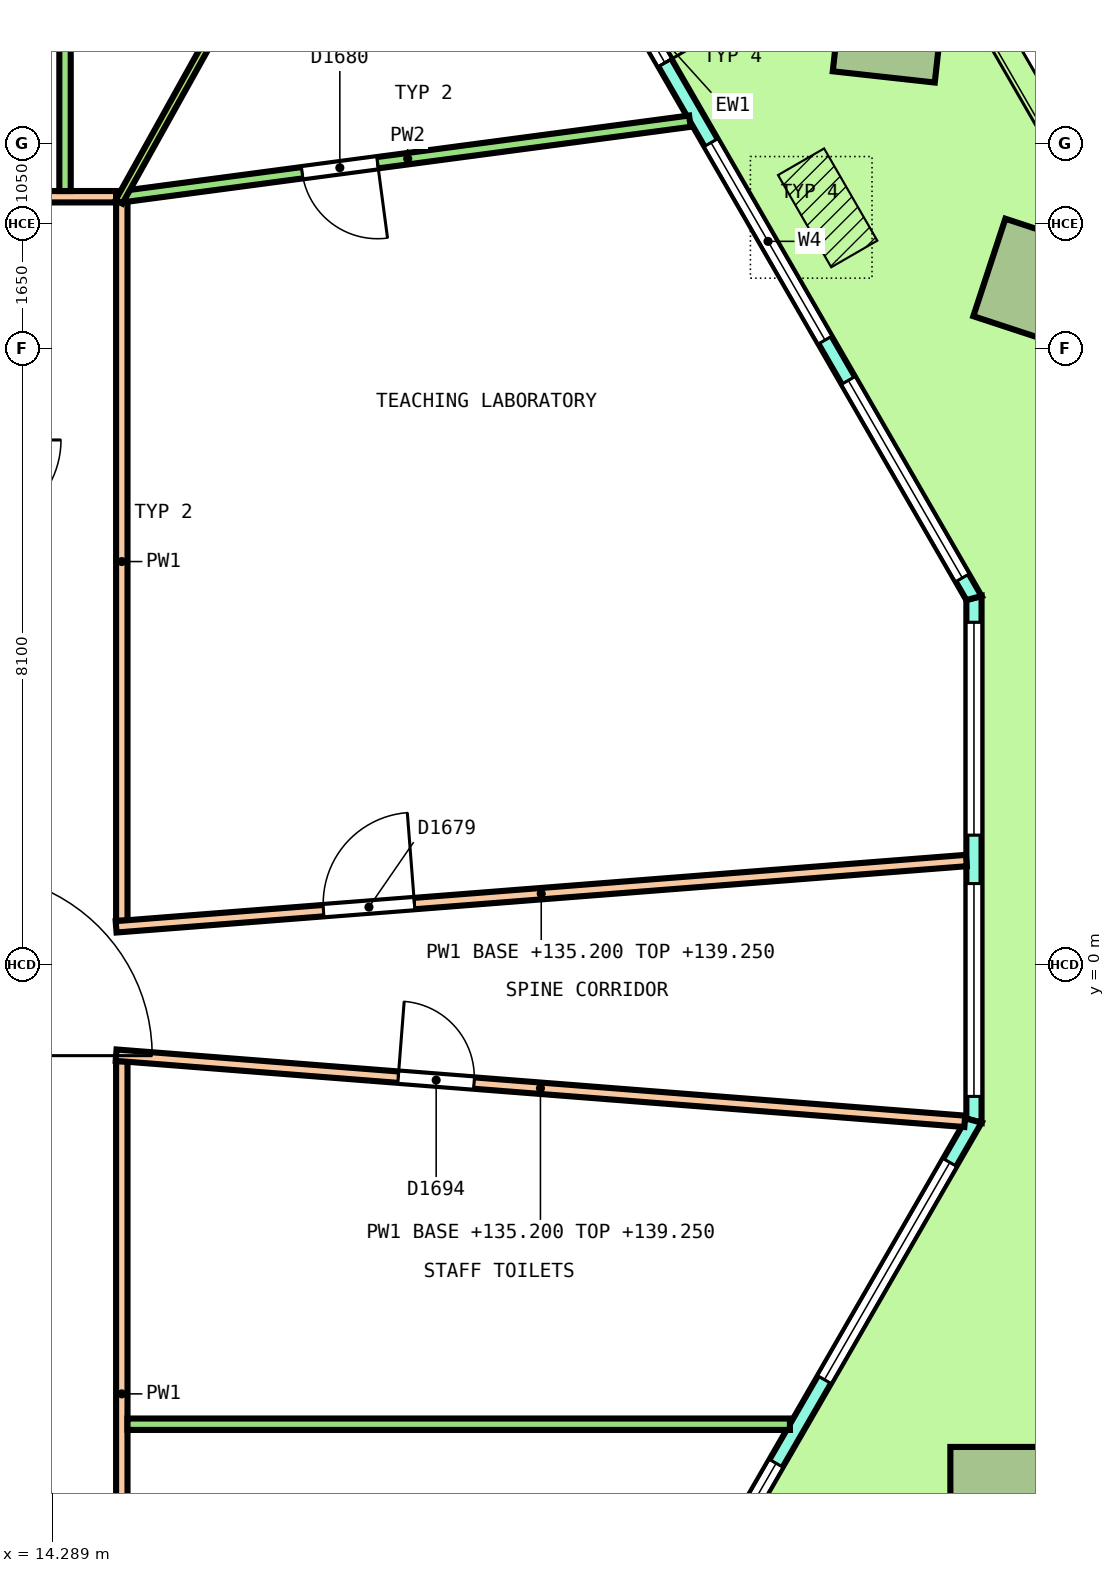
"""IFC4 building model, lengths in metres.
Left out: names, types, materials, properties, quantities, classifications, styles, units other than length and angle.
Written with IfcOpenShell. Run it as: python <this file> out.ifc"""

import sys

from ifc_helpers import new_model, si_unit, direction, frame, frame_2d, origin, origin_2d, place, context, subcontext, project, spatial, polyline, rectangle, outline, extrude, element, fill, save


model = new_model("IFC4")
c1 = context("Model", 3, precision=1e-05, world=origin(), true_north=direction((0.0, 1.0)))
c2 = subcontext(c1, "Body", "Model", "MODEL_VIEW")
j1 = project(units=[si_unit("LENGTHUNIT", "METRE"), si_unit("PLANEANGLEUNIT", "RADIAN")], contexts=[c1])
p1 = place(None, origin())
s1 = spatial("IfcSite", under=j1, at=p1, CompositionType="ELEMENT")
p2 = place(p1, origin())
s2 = spatial("IfcBuilding", under=s1, at=p2, CompositionType="ELEMENT")
p3 = place(p2, frame((0.0, 0.0, 135.2)))
s3 = spatial("IfcBuildingStorey", under=s2, at=p3, CompositionType="ELEMENT", Elevation=135.2)
p4 = place(p3, frame((27.255, 8.959, 0.0), z_axis=(-0.206604255639, -0.238543908815, 0.948900144967), x_axis=(-0.524107453988, 0.845931636481, 0.098544624791)))
e1 = element("IfcColumn", 1, at=p4, inside=s3, PredefinedType="COLUMN", context=c2, shape_type="SweptSolid", body=[
    extrude(rectangle(XDim=1.35, YDim=1.35, at=origin_2d()), origin(), (0.0, 0.0, 1.0), 4.258),
])
p5 = place(p3, frame((25.299, 12.347, 0.0), z_axis=(-0.242216248762, -0.179760869681, 0.953423997268), x_axis=(-0.508552704351, 0.860397321393, 0.033024176556)))
e2 = element("IfcColumn", 2, at=p5, inside=s3, PredefinedType="COLUMN", context=c2, shape_type="SweptSolid", body=[
    extrude(rectangle(XDim=1.35, YDim=1.35, at=origin_2d()), origin(), (0.0, 0.0, 1.0), 4.237),
])
p6 = place(p3, frame((26.776, -7.023, 0.0), z_axis=(-0.106402456539, -0.184226228858, 0.977107575369), x_axis=(0.488665296242, 0.846135593228, 0.212745825157)))
e3 = element("IfcColumn", 3, at=p6, inside=s3, PredefinedType="COLUMN", context=c2, shape_type="SweptSolid", body=[
    extrude(rectangle(XDim=1.35, YDim=1.35, at=origin_2d()), origin(), (0.0, 0.0, 1.0), 4.135),
])
p7 = place(p3, frame((26.411, -2.055, 0.0), z_axis=(0.0, 0.0, 1.0), x_axis=(0.0, 1.0, 0.0)))
e4 = element("IfcWall", 4, at=p7, inside=s3, PredefinedType="SOLIDWALL", context=c2, shape_type="SweptSolid", body=[
    extrude(outline(polyline([(-0.027, -0.1), (1.128, -0.1), (2.283, -0.1), (3.438, -0.1), (4.592, -0.1), (5.747, -0.1), (6.902, -0.1), (6.848, 0.1), (5.711, 0.1), (4.574, 0.1), (3.438, 0.1), (2.301, 0.1), (1.164, 0.1), (0.027, 0.1), (-0.027, -0.1)])), origin(), (0.0, 0.0, 1.0), 4.1),
])
p8 = place(p7, frame((0.319, 0.0, 0.1)))
e5 = element("IfcOpeningElement", 5, at=p8, cuts=e4, PredefinedType="OPENING", context=c2, shape_type="SweptSolid", body=[
    extrude(rectangle(XDim=2.8, YDim=2.9, at=frame_2d((1.4, 1.45))), frame((0.0, 0.11, 0.0), z_axis=(0.0, -1.0, 0.0), x_axis=(1.0, 0.0, 0.0)), (0.0, 0.0, 1.0), 0.22),
])
p9 = place(p7, frame((3.756, 0.0, 0.1)))
e6 = element("IfcOpeningElement", 6, at=p9, cuts=e4, PredefinedType="OPENING", context=c2, shape_type="SweptSolid", body=[
    extrude(rectangle(XDim=2.8, YDim=2.9, at=frame_2d((1.4, 1.45))), frame((0.0, 0.11, 0.0), z_axis=(0.0, -1.0, 0.0), x_axis=(1.0, 0.0, 0.0)), (0.0, 0.0, 1.0), 0.22),
])
p10 = place(p3, frame((26.411, 4.82, 0.0), z_axis=(0.0, 0.0, 1.0), x_axis=(-0.500000137386, 0.866025324465, 0.0)))
e7 = element("IfcWall", 7, at=p10, inside=s3, PredefinedType="SOLIDWALL", context=c2, shape_type="SweptSolid", body=[
    extrude(outline(polyline([(-0.027, -0.1), (0.979, -0.1), (1.986, -0.1), (2.992, -0.1), (3.999, -0.1), (5.005, -0.1), (6.012, -0.1), (7.018, -0.1), (8.025, -0.1), (9.031, -0.1), (10.038, -0.1), (11.044, -0.1), (12.051, -0.1), (13.057, -0.1), (14.063, -0.1), (15.07, -0.1), (16.076, -0.1), (17.083, -0.1), (18.089, -0.1), (18.036, 0.1), (17.035, 0.1), (16.035, 0.1), (15.034, 0.1), (14.034, 0.1), (13.033, 0.1), (12.033, 0.1), (11.032, 0.1), (10.032, 0.1), (9.031, 0.1), (8.031, 0.1), (7.03, 0.1), (6.03, 0.1), (5.029, 0.1), (4.029, 0.1), (3.028, 0.1), (2.028, 0.1), (1.027, 0.1), (0.027, 0.1), (-0.027, -0.1)])), origin(), (0.0, 0.0, 1.0), 4.1),
])
p11 = place(p10, frame((0.306, 0.0, 0.1)))
e8 = element("IfcOpeningElement", 8, at=p11, cuts=e7, PredefinedType="OPENING", context=c2, shape_type="SweptSolid", body=[
    extrude(rectangle(XDim=3.0, YDim=2.9, at=frame_2d((1.5, 1.45))), frame((0.0, 0.11, 0.0), z_axis=(0.0, -1.0, 0.0), x_axis=(1.0, 0.0, 0.0)), (0.0, 0.0, 1.0), 0.22),
])
p12 = place(p10, frame((3.919, 0.0, 0.1)))
e9 = element("IfcOpeningElement", 9, at=p12, cuts=e7, PredefinedType="OPENING", context=c2, shape_type="SweptSolid", body=[
    extrude(rectangle(XDim=3.0, YDim=2.9, at=frame_2d((1.5, 1.45))), frame((0.0, 0.11, 0.0), z_axis=(0.0, -1.0, 0.0), x_axis=(1.0, 0.0, 0.0)), (0.0, 0.0, 1.0), 0.22),
])
p13 = place(p10, frame((8.131, 0.0, 0.0)))
e10 = element("IfcOpeningElement", 10, at=p13, cuts=e7, PredefinedType="OPENING", context=c2, shape_type="SweptSolid", body=[
    extrude(rectangle(XDim=1.8, YDim=2.4, at=frame_2d((0.9, 1.2))), frame((0.0, 0.11, 0.0), z_axis=(0.0, -1.0, 0.0), x_axis=(1.0, 0.0, 0.0)), (0.0, 0.0, 1.0), 0.22),
])
p14 = place(p10, frame((8.131, 0.0, 2.55)))
e11 = element("IfcOpeningElement", 11, at=p14, cuts=e7, PredefinedType="OPENING", context=c2, shape_type="SweptSolid", body=[
    extrude(rectangle(XDim=1.8, YDim=0.45, at=frame_2d((0.9, 0.225))), frame((0.0, 0.11, 0.0), z_axis=(0.0, -1.0, 0.0), x_axis=(1.0, 0.0, 0.0)), (0.0, 0.0, 1.0), 0.22),
])
p15 = place(p10, frame((11.144, 0.0, 0.1)))
e12 = element("IfcOpeningElement", 12, at=p15, cuts=e7, PredefinedType="OPENING", context=c2, shape_type="SweptSolid", body=[
    extrude(rectangle(XDim=3.0, YDim=2.9, at=frame_2d((1.5, 1.45))), frame((0.0, 0.11, 0.0), z_axis=(0.0, -1.0, 0.0), x_axis=(1.0, 0.0, 0.0)), (0.0, 0.0, 1.0), 0.22),
])
p16 = place(p10, frame((14.756, 0.0, 0.1)))
e13 = element("IfcOpeningElement", 13, at=p16, cuts=e7, PredefinedType="OPENING", context=c2, shape_type="SweptSolid", body=[
    extrude(rectangle(XDim=3.0, YDim=2.9, at=frame_2d((1.5, 1.45))), frame((0.0, 0.11, 0.0), z_axis=(0.0, -1.0, 0.0), x_axis=(1.0, 0.0, 0.0)), (0.0, 0.0, 1.0), 0.22),
])
p17 = place(p3, frame((14.985, -21.845, 0.0), z_axis=(0.0, 0.0, 1.0), x_axis=(0.50000204422, 0.86602422355, 0.0)))
e14 = element("IfcWall", 14, at=p17, inside=s3, PredefinedType="SOLIDWALL", context=c2, shape_type="SweptSolid", body=[
    extrude(outline(polyline([(-0.027, -0.1), (1.014, -0.1), (2.055, -0.1), (3.097, -0.1), (4.138, -0.1), (5.179, -0.1), (6.22, -0.1), (7.261, -0.1), (8.303, -0.1), (9.344, -0.1), (10.385, -0.1), (11.426, -0.1), (12.468, -0.1), (13.509, -0.1), (14.55, -0.1), (15.591, -0.1), (16.632, -0.1), (17.673, -0.1), (18.715, -0.1), (19.756, -0.1), (20.797, -0.1), (21.838, -0.1), (22.879, -0.1), (22.826, 0.1), (21.789, 0.1), (20.753, 0.1), (19.717, 0.1), (18.68, 0.1), (17.644, 0.1), (16.608, 0.1), (15.572, 0.1), (14.535, 0.1), (13.499, 0.1), (12.463, 0.1), (11.426, 0.1), (10.39, 0.1), (9.354, 0.1), (8.317, 0.1), (7.281, 0.1), (6.245, 0.1), (5.208, 0.1), (4.172, 0.1), (3.136, 0.1), (2.099, 0.1), (1.063, 0.1), (0.027, 0.1), (-0.027, -0.1)])), origin(), (0.0, 0.0, 1.0), 4.1),
])
p18 = place(p17, frame((0.635, 0.0, 0.1)))
e15 = element("IfcOpeningElement", 15, at=p18, cuts=e14, PredefinedType="OPENING", context=c2, shape_type="SweptSolid", body=[
    extrude(rectangle(XDim=3.3, YDim=2.9, at=frame_2d((1.65, 1.45))), frame((0.0, 0.11, 0.0), z_axis=(0.0, -1.0, 0.0), x_axis=(1.0, 0.0, 0.0)), (0.0, 0.0, 1.0), 0.22),
])
p19 = place(p17, frame((5.206, 0.0, 0.1)))
e16 = element("IfcOpeningElement", 16, at=p19, cuts=e14, PredefinedType="OPENING", context=c2, shape_type="SweptSolid", body=[
    extrude(rectangle(XDim=3.3, YDim=2.9, at=frame_2d((1.65, 1.45))), frame((0.0, 0.11, 0.0), z_axis=(0.0, -1.0, 0.0), x_axis=(1.0, 0.0, 0.0)), (0.0, 0.0, 1.0), 0.22),
])
p20 = place(p17, frame((10.526, 0.0, 0.0)))
e17 = element("IfcOpeningElement", 17, at=p20, cuts=e14, PredefinedType="OPENING", context=c2, shape_type="SweptSolid", body=[
    extrude(rectangle(XDim=1.8, YDim=2.4, at=frame_2d((0.9, 1.2))), frame((0.0, 0.11, 0.0), z_axis=(0.0, -1.0, 0.0), x_axis=(1.0, 0.0, 0.0)), (0.0, 0.0, 1.0), 0.22),
])
p21 = place(p17, frame((10.526, 0.0, 2.55)))
e18 = element("IfcOpeningElement", 18, at=p21, cuts=e14, PredefinedType="OPENING", context=c2, shape_type="SweptSolid", body=[
    extrude(rectangle(XDim=1.8, YDim=0.45, at=frame_2d((0.9, 0.225))), frame((0.0, 0.11, 0.0), z_axis=(0.0, -1.0, 0.0), x_axis=(1.0, 0.0, 0.0)), (0.0, 0.0, 1.0), 0.22),
])
p22 = place(p17, frame((14.347, 0.0, 0.1)))
e19 = element("IfcOpeningElement", 19, at=p22, cuts=e14, PredefinedType="OPENING", context=c2, shape_type="SweptSolid", body=[
    extrude(rectangle(XDim=3.3, YDim=2.9, at=frame_2d((1.65, 1.45))), frame((0.0, 0.11, 0.0), z_axis=(0.0, -1.0, 0.0), x_axis=(1.0, 0.0, 0.0)), (0.0, 0.0, 1.0), 0.22),
])
p23 = place(p17, frame((18.917, 0.0, 0.1)))
e20 = element("IfcOpeningElement", 20, at=p23, cuts=e14, PredefinedType="OPENING", context=c2, shape_type="SweptSolid", body=[
    extrude(rectangle(XDim=3.3, YDim=2.9, at=frame_2d((1.65, 1.45))), frame((0.0, 0.11, 0.0), z_axis=(0.0, -1.0, 0.0), x_axis=(1.0, 0.0, 0.0)), (0.0, 0.0, 1.0), 0.22),
])
p24 = place(p3, frame((15.2, -10.025, 0.0), z_axis=(0.0, 0.0, 1.0), x_axis=(0.0, 1.0, 0.0)))
e21 = element("IfcWall", 21, at=p24, inside=s3, PredefinedType="PARTITIONING", context=c2, shape_type="SweptSolid", body=[
    extrude(rectangle(XDim=8.75, YDim=0.15, at=frame_2d((4.375, 0.0))), origin(), (0.0, 0.0, 1.0), 3.05),
])
p25 = place(p24, frame((0.813, 0.0, 0.0)))
e22 = element("IfcOpeningElement", 22, at=p25, cuts=e21, PredefinedType="OPENING", context=c2, shape_type="SweptSolid", body=[
    extrude(rectangle(XDim=1.2, YDim=2.1, at=frame_2d((0.6, 1.05))), frame((0.0, 0.085, 0.0), z_axis=(0.0, -1.0, 0.0), x_axis=(1.0, 0.0, 0.0)), (0.0, 0.0, 1.0), 0.17),
])
p26 = place(p3, frame((15.2, 0.576, 0.0), z_axis=(0.0, 0.0, 1.0), x_axis=(0.0, 1.0, 0.0)))
e23 = element("IfcWall", 23, at=p26, inside=s3, PredefinedType="PARTITIONING", context=c2, shape_type="SweptSolid", body=[
    extrude(rectangle(XDim=9.449, YDim=0.15, at=frame_2d((4.725, 0.0))), origin(), (0.0, 0.0, 1.0), 3.05),
])
p27 = place(p3, frame((-15.125, 10.1, 0.0), z_axis=(0.0, 0.0, 1.0), x_axis=(1.0, 0.0, 0.0)))
e24 = element("IfcWall", 24, at=p27, inside=s3, PredefinedType="PARTITIONING", context=c2, shape_type="SweptSolid", body=[
    extrude(rectangle(XDim=30.25, YDim=0.15, at=frame_2d((15.125, 0.0))), origin(), (0.0, 0.0, 1.0), 3.05),
])
p28 = place(p27, frame((16.895, 0.0, 0.0)))
e25 = element("IfcOpeningElement", 25, at=p28, cuts=e24, PredefinedType="OPENING", context=c2, shape_type="SweptSolid", body=[
    extrude(rectangle(XDim=1.2, YDim=2.1, at=frame_2d((0.6, 1.05))), frame((0.0, 0.085, 0.0), z_axis=(0.0, -1.0, 0.0), x_axis=(1.0, 0.0, 0.0)), (0.0, 0.0, 1.0), 0.17),
])
p29 = place(p27, frame((6.564, 0.0, 0.0)))
e26 = element("IfcOpeningElement", 26, at=p29, cuts=e24, PredefinedType="OPENING", context=c2, shape_type="SweptSolid", body=[
    extrude(rectangle(XDim=1.2, YDim=2.1, at=frame_2d((0.6, 1.05))), frame((0.0, 0.085, 0.0), z_axis=(0.0, -1.0, 0.0), x_axis=(1.0, 0.0, 0.0)), (0.0, 0.0, 1.0), 0.17),
])
p30 = place(p27, frame((1.476, 0.0, 0.0)))
e27 = element("IfcOpeningElement", 27, at=p30, cuts=e24, PredefinedType="OPENING", context=c2, shape_type="SweptSolid", body=[
    extrude(rectangle(XDim=1.2, YDim=2.1, at=frame_2d((0.6, 1.05))), frame((0.0, 0.085, 0.0), z_axis=(0.0, -1.0, 0.0), x_axis=(1.0, 0.0, 0.0)), (0.0, 0.0, 1.0), 0.17),
])
p31 = place(p3, frame((15.125, 0.495, 0.0), z_axis=(0.0, 0.0, 1.0), x_axis=(0.996973035288, 0.07774809907, 0.0)))
e28 = element("IfcWall", 28, at=p31, inside=s3, PredefinedType="PARTITIONING", context=c2, shape_type="SweptSolid", body=[
    extrude(rectangle(XDim=11.22, YDim=0.15, at=frame_2d((5.61, 0.0))), origin(), (0.0, 0.0, 1.0), 4.05),
])
p32 = place(p31, frame((2.736, 0.0, 0.0)))
e29 = element("IfcOpeningElement", 29, at=p32, cuts=e28, PredefinedType="OPENING", context=c2, shape_type="SweptSolid", body=[
    extrude(rectangle(XDim=1.2, YDim=2.1, at=frame_2d((0.6, 1.05))), frame((0.0, 0.085, 0.0), z_axis=(0.0, -1.0, 0.0), x_axis=(1.0, 0.0, 0.0)), (0.0, 0.0, 1.0), 0.17),
])
p33 = place(p3, frame((15.125, -1.194, 0.0), z_axis=(0.0, 0.0, 1.0), x_axis=(0.996973662759, -0.07774005251, 0.0)))
e30 = element("IfcWall", 30, at=p33, inside=s3, PredefinedType="PARTITIONING", context=c2, shape_type="SweptSolid", body=[
    extrude(rectangle(XDim=11.199, YDim=0.15, at=frame_2d((5.6, 0.0))), origin(), (0.0, 0.0, 1.0), 4.05),
])
p34 = place(p33, frame((3.723, 0.0, 0.0)))
e31 = element("IfcOpeningElement", 31, at=p34, cuts=e30, PredefinedType="OPENING", context=c2, shape_type="SweptSolid", body=[
    extrude(rectangle(XDim=1.0, YDim=2.1, at=frame_2d((0.5, 1.05))), frame((0.0, 0.085, 0.0), z_axis=(0.0, -1.0, 0.0), x_axis=(1.0, 0.0, 0.0)), (0.0, 0.0, 1.0), 0.17),
])
p35 = place(p3, frame((15.25, 10.107, 0.0), z_axis=(0.0, 0.0, 1.0), x_axis=(0.991272259153, 0.131830604315, 0.0)))
e32 = element("IfcWall", 32, at=p35, inside=s3, PredefinedType="PARTITIONING", context=c2, shape_type="SweptSolid", body=[
    extrude(rectangle(XDim=7.489, YDim=0.15, at=frame_2d((3.745, 0.0))), origin(), (0.0, 0.0, 1.0), 3.05),
])
p36 = place(p35, frame((2.344, 0.0, 0.0)))
e33 = element("IfcOpeningElement", 33, at=p36, cuts=e32, PredefinedType="OPENING", context=c2, shape_type="SweptSolid", body=[
    extrude(rectangle(XDim=1.0, YDim=2.1, at=frame_2d((0.5, 1.05))), frame((0.0, 0.085, 0.0), z_axis=(0.0, -1.0, 0.0), x_axis=(1.0, 0.0, 0.0)), (0.0, 0.0, 1.0), 0.17),
])
p37 = place(p3, frame((14.453, 10.175, 0.0), z_axis=(0.0, 0.0, 1.0), x_axis=(0.0, 1.0, 0.0)))
e34 = element("IfcWall", 34, at=p37, inside=s3, PredefinedType="PARTITIONING", context=c2, shape_type="SweptSolid", body=[
    extrude(rectangle(XDim=11.862, YDim=0.15, at=frame_2d((5.931, 0.0))), origin(), (0.0, 0.0, 1.0), 3.05),
])
p38 = place(p3, frame((15.275, -6.049, 0.0), z_axis=(0.0, 0.0, 1.0), x_axis=(1.0, 0.0, 0.0)))
e35 = element("IfcWall", 35, at=p38, inside=s3, PredefinedType="PARTITIONING", context=c2, shape_type="SweptSolid", body=[
    extrude(rectangle(XDim=8.715, YDim=0.15, at=frame_2d((4.357, 0.0))), origin(), (0.0, 0.0, 1.0), 3.05),
])
p39 = place(p3, frame((15.164, 10.034, 0.0), z_axis=(0.0, 0.0, 1.0), x_axis=(0.486568356271, 0.873642509655, 0.0)))
e36 = element("IfcWall", 36, at=p39, inside=s3, PredefinedType="PARTITIONING", context=c2, shape_type="SweptSolid", body=[
    extrude(rectangle(XDim=8.196, YDim=0.1, at=frame_2d((4.098, 0.0))), origin(), (0.0, 0.0, 1.0), 3.05),
])
p40 = place(p39, frame((3.635, 0.0, 0.0)))
e37 = element("IfcOpeningElement", 37, at=p40, cuts=e36, PredefinedType="OPENING", context=c2, shape_type="SweptSolid", body=[
    extrude(rectangle(XDim=1.0, YDim=2.1, at=frame_2d((0.5, 1.05))), frame((0.0, 0.06, 0.0), z_axis=(0.0, -1.0, 0.0), x_axis=(1.0, 0.0, 0.0)), (0.0, 0.0, 1.0), 0.12),
])
p41 = place(p8, origin())
e38 = element("IfcWindow", 38, at=p41, inside=s3, PartitioningType="SINGLE_PANEL", PredefinedType="WINDOW", context=c2, shape_type="SweptSolid", body=[
    extrude(rectangle(XDim=2.8, YDim=2.9, at=frame_2d((1.4, 1.45))), frame((0.0, 0.03, 0.0), z_axis=(0.0, -1.0, 0.0), x_axis=(1.0, 0.0, 0.0)), (0.0, 0.0, 1.0), 0.06),
])
fill(e5, e38)
p42 = place(p9, origin())
e39 = element("IfcWindow", 39, at=p42, inside=s3, PartitioningType="SINGLE_PANEL", PredefinedType="WINDOW", context=c2, shape_type="SweptSolid", body=[
    extrude(rectangle(XDim=2.8, YDim=2.9, at=frame_2d((1.4, 1.45))), frame((0.0, 0.03, 0.0), z_axis=(0.0, -1.0, 0.0), x_axis=(1.0, 0.0, 0.0)), (0.0, 0.0, 1.0), 0.06),
])
fill(e6, e39)
p43 = place(p11, origin())
e40 = element("IfcWindow", 40, at=p43, inside=s3, PartitioningType="SINGLE_PANEL", PredefinedType="WINDOW", context=c2, shape_type="SweptSolid", body=[
    extrude(rectangle(XDim=3.0, YDim=2.9, at=frame_2d((1.5, 1.45))), frame((0.0, 0.03, 0.0), z_axis=(0.0, -1.0, 0.0), x_axis=(1.0, 0.0, 0.0)), (0.0, 0.0, 1.0), 0.06),
])
fill(e8, e40)
p44 = place(p12, origin())
e41 = element("IfcWindow", 41, at=p44, inside=s3, PartitioningType="SINGLE_PANEL", PredefinedType="WINDOW", context=c2, shape_type="SweptSolid", body=[
    extrude(rectangle(XDim=3.0, YDim=2.9, at=frame_2d((1.5, 1.45))), frame((0.0, 0.03, 0.0), z_axis=(0.0, -1.0, 0.0), x_axis=(1.0, 0.0, 0.0)), (0.0, 0.0, 1.0), 0.06),
])
fill(e9, e41)
p45 = place(p13, origin())
e42 = element("IfcDoor", 42, at=p45, inside=s3, OperationType="DOUBLE_DOOR_SINGLE_SWING", PredefinedType="DOOR", context=c2, shape_type="SweptSolid", body=[
    extrude(rectangle(XDim=1.8, YDim=2.4, at=frame_2d((0.9, 1.2))), frame((0.0, 0.025, 0.0), z_axis=(0.0, -1.0, 0.0), x_axis=(1.0, 0.0, 0.0)), (0.0, 0.0, 1.0), 0.05),
])
fill(e10, e42)
p46 = place(p14, origin())
e43 = element("IfcWindow", 43, at=p46, inside=s3, PartitioningType="SINGLE_PANEL", PredefinedType="WINDOW", context=c2, shape_type="SweptSolid", body=[
    extrude(rectangle(XDim=1.8, YDim=0.45, at=frame_2d((0.9, 0.225))), frame((0.0, 0.03, 0.0), z_axis=(0.0, -1.0, 0.0), x_axis=(1.0, 0.0, 0.0)), (0.0, 0.0, 1.0), 0.06),
])
fill(e11, e43)
p47 = place(p22, origin())
e44 = element("IfcWindow", 44, at=p47, inside=s3, PartitioningType="SINGLE_PANEL", PredefinedType="WINDOW", context=c2, shape_type="SweptSolid", body=[
    extrude(rectangle(XDim=3.3, YDim=2.9, at=frame_2d((1.65, 1.45))), frame((0.0, 0.03, 0.0), z_axis=(0.0, -1.0, 0.0), x_axis=(1.0, 0.0, 0.0)), (0.0, 0.0, 1.0), 0.06),
])
fill(e19, e44)
p48 = place(p23, origin())
e45 = element("IfcWindow", 45, at=p48, inside=s3, PartitioningType="SINGLE_PANEL", PredefinedType="WINDOW", context=c2, shape_type="SweptSolid", body=[
    extrude(rectangle(XDim=3.3, YDim=2.9, at=frame_2d((1.65, 1.45))), frame((0.0, 0.03, 0.0), z_axis=(0.0, -1.0, 0.0), x_axis=(1.0, 0.0, 0.0)), (0.0, 0.0, 1.0), 0.06),
])
fill(e20, e45)
p49 = place(p32, origin())
e46 = element("IfcDoor", 46, at=p49, inside=s3, OperationType="DOUBLE_DOOR_SINGLE_SWING", PredefinedType="DOOR", context=c2, shape_type="SweptSolid", body=[
    extrude(rectangle(XDim=1.2, YDim=2.1, at=frame_2d((0.6, 1.05))), frame((0.0, 0.025, 0.0), z_axis=(0.0, -1.0, 0.0), x_axis=(1.0, 0.0, 0.0)), (0.0, 0.0, 1.0), 0.05),
])
fill(e29, e46)
p50 = place(p36, origin())
e47 = element("IfcDoor", 47, at=p50, inside=s3, OperationType="SINGLE_SWING_RIGHT", PredefinedType="DOOR", context=c2, shape_type="SweptSolid", body=[
    extrude(rectangle(XDim=1.0, YDim=2.1, at=frame_2d((0.5, 1.05))), frame((0.0, 0.025, 0.0), z_axis=(0.0, -1.0, 0.0), x_axis=(1.0, 0.0, 0.0)), (0.0, 0.0, 1.0), 0.05),
])
fill(e33, e47)
p51 = place(p34, origin())
e48 = element("IfcDoor", 48, at=p51, inside=s3, OperationType="SINGLE_SWING_RIGHT", PredefinedType="DOOR", context=c2, shape_type="SweptSolid", body=[
    extrude(rectangle(XDim=1.0, YDim=2.1, at=frame_2d((0.5, 1.05))), frame((0.0, 0.025, 0.0), z_axis=(0.0, -1.0, 0.0), x_axis=(1.0, 0.0, 0.0)), (0.0, 0.0, 1.0), 0.05),
])
fill(e31, e48)
save(model, sys.argv[1])
